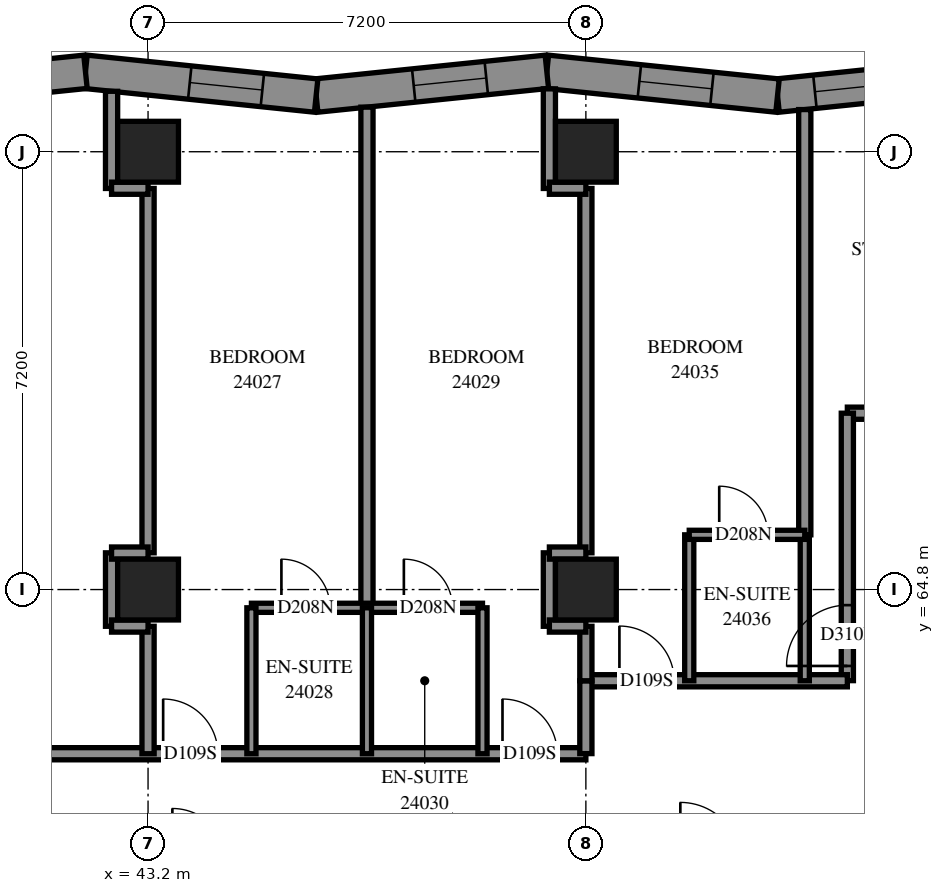
"""IFC4 building model, lengths in metres.
Left out: names, types, materials, properties, quantities, classifications, styles, units other than length and angle.
Written with IfcOpenShell. Run it as: python <this file> out.ifc"""

import sys

from ifc_helpers import new_model, si_unit, direction, frame, frame_2d, origin, origin_2d, place, context, subcontext, project, spatial, polyline, rectangle, outline, extrude, element, fill, save


model = new_model("IFC4")
c1 = context("Model", 3, precision=1e-05, world=origin(), true_north=direction((0.0, 1.0)))
c2 = subcontext(c1, "Body", "Model", "MODEL_VIEW")
j1 = project(units=[si_unit("LENGTHUNIT", "METRE"), si_unit("PLANEANGLEUNIT", "RADIAN")], contexts=[c1])
p1 = place(None, origin())
s1 = spatial("IfcSite", under=j1, at=p1, CompositionType="ELEMENT")
p2 = place(p1, origin())
s2 = spatial("IfcBuilding", under=s1, at=p2, CompositionType="ELEMENT")
p3 = place(p2, frame((0.0, 0.0, 91.4)))
s3 = spatial("IfcBuildingStorey", under=s2, at=p3, CompositionType="ELEMENT", Elevation=91.4)
for number, where, z_axis, x_axis in (
    (1, (43.2, 64.8, 0.0), (0.0, 0.0, 1.0), (1.0, 0.0, 0.0)),
    (2, (43.2, 72.0, 0.0), (0.0, 0.0, 1.0), (1.0, 0.0, 0.0)),
    (3, (50.4, 64.8, 0.0), (0.0, 0.0, 1.0), (1.0, 0.0, 0.0)),
    (4, (50.4, 72.0, 0.0), (0.0, 0.0, 1.0), (1.0, 0.0, 0.0)),
):
    element("IfcColumn", number, at=place(p3, frame(where, z_axis=z_axis, x_axis=x_axis)), inside=s3, PredefinedType="COLUMN", context=c2, shape_type="SweptSolid", body=[
        extrude(rectangle(XDim=1.0, YDim=1.0, at=origin_2d()), origin(), (0.0, 0.0, 1.0), 3.1),
    ])
p4 = place(p3, frame((57.346, 73.314, 0.0), z_axis=(0.0, 0.0, 1.0), x_axis=(-0.9947304076, -0.1025251975, 0.0)))
e5 = element("IfcWall", 5, at=p4, inside=s3, PredefinedType="SOLIDWALL", context=c2, shape_type="SweptSolid", body=[
    extrude(outline(polyline([(-0.028, -0.275), (3.785, -0.275), (3.842, 0.275), (0.028, 0.275), (-0.028, -0.275)])), origin(), (0.0, 0.0, 1.0), 3.1),
])
p5 = place(p4, frame((0.396, 0.0, 0.5)))
e6 = element("IfcOpeningElement", 6, at=p5, cuts=e5, PredefinedType="OPENING", context=c2, shape_type="SweptSolid", body=[
    extrude(rectangle(XDim=1.3, YDim=2.45, at=frame_2d((0.65, 1.225))), frame((0.0, 0.285, 0.0), z_axis=(0.0, -1.0, 0.0), x_axis=(1.0, 0.0, 0.0)), (0.0, 0.0, 1.0), 0.57),
])
p6 = place(p4, frame((1.896, 0.0, 0.5)))
e7 = element("IfcOpeningElement", 7, at=p6, cuts=e5, PredefinedType="OPENING", context=c2, shape_type="SweptSolid", body=[
    extrude(rectangle(XDim=1.3, YDim=2.45, at=frame_2d((0.65, 1.225))), frame((0.0, 0.285, 0.0), z_axis=(0.0, -1.0, 0.0), x_axis=(1.0, 0.0, 0.0)), (0.0, 0.0, 1.0), 0.57),
])
p7 = place(p3, frame((53.552, 72.924, 0.0), z_axis=(0.0, 0.0, 1.0), x_axis=(-0.9947306832, 0.1025225234, 0.0)))
e8 = element("IfcWall", 8, at=p7, inside=s3, PredefinedType="SOLIDWALL", context=c2, shape_type="SweptSolid", body=[
    extrude(outline(polyline([(0.028, -0.275), (3.842, -0.275), (3.785, 0.275), (-0.028, 0.275), (0.028, -0.275)])), origin(), (0.0, 0.0, 1.0), 3.1),
])
p8 = place(p7, frame((1.084, 0.0, 0.5)))
e9 = element("IfcOpeningElement", 9, at=p8, cuts=e8, PredefinedType="OPENING", context=c2, shape_type="SweptSolid", body=[
    extrude(rectangle(XDim=1.2, YDim=2.45, at=frame_2d((0.6, 1.225))), frame((0.0, 0.285, 0.0), z_axis=(0.0, -1.0, 0.0), x_axis=(1.0, 0.0, 0.0)), (0.0, 0.0, 1.0), 0.57),
])
p9 = place(p3, frame((49.758, 73.314, 0.0), z_axis=(0.0, 0.0, 1.0), x_axis=(-0.9947306832, -0.1025225234, 0.0)))
e10 = element("IfcWall", 10, at=p9, inside=s3, PredefinedType="SOLIDWALL", context=c2, shape_type="SweptSolid", body=[
    extrude(outline(polyline([(-0.028, -0.275), (3.785, -0.275), (3.842, 0.275), (0.028, 0.275), (-0.028, -0.275)])), origin(), (0.0, 0.0, 1.0), 3.1),
])
p10 = place(p9, frame((1.001, 0.0, 0.5)))
e11 = element("IfcOpeningElement", 11, at=p10, cuts=e10, PredefinedType="OPENING", context=c2, shape_type="SweptSolid", body=[
    extrude(rectangle(XDim=1.2, YDim=2.45, at=frame_2d((0.6, 1.225))), frame((0.0, 0.285, 0.0), z_axis=(0.0, -1.0, 0.0), x_axis=(1.0, 0.0, 0.0)), (0.0, 0.0, 1.0), 0.57),
])
p11 = place(p3, frame((45.965, 72.924, 0.0), z_axis=(0.0, 0.0, 1.0), x_axis=(-0.9947304076, 0.1025251975, 0.0)))
e12 = element("IfcWall", 12, at=p11, inside=s3, PredefinedType="SOLIDWALL", context=c2, shape_type="SweptSolid", body=[
    extrude(outline(polyline([(0.028, -0.275), (3.842, -0.275), (3.785, 0.275), (-0.028, 0.275), (0.028, -0.275)])), origin(), (0.0, 0.0, 1.0), 3.1),
])
p12 = place(p11, frame((0.89, 0.0, 0.5)))
e13 = element("IfcOpeningElement", 13, at=p12, cuts=e12, PredefinedType="OPENING", context=c2, shape_type="SweptSolid", body=[
    extrude(rectangle(XDim=1.2, YDim=2.45, at=frame_2d((0.6, 1.225))), frame((0.0, 0.285, 0.0), z_axis=(0.0, -1.0, 0.0), x_axis=(1.0, 0.0, 0.0)), (0.0, 0.0, 1.0), 0.57),
])
p13 = place(p3, frame((42.171, 73.314, 0.0), z_axis=(0.0, 0.0, 1.0), x_axis=(-0.9947306832, -0.1025225234, 0.0)))
e14 = element("IfcWall", 14, at=p13, inside=s3, PredefinedType="SOLIDWALL", context=c2, shape_type="SweptSolid", body=[
    extrude(outline(polyline([(-0.028, -0.275), (3.785, -0.275), (3.842, 0.275), (0.028, 0.275), (-0.028, -0.275)])), origin(), (0.0, 0.0, 1.0), 3.1),
])
p14 = place(p13, frame((0.806, 0.0, 0.5)))
e15 = element("IfcOpeningElement", 15, at=p14, cuts=e14, PredefinedType="OPENING", context=c2, shape_type="SweptSolid", body=[
    extrude(rectangle(XDim=1.2, YDim=2.45, at=frame_2d((0.6, 1.225))), frame((0.0, 0.285, 0.0), z_axis=(0.0, -1.0, 0.0), x_axis=(1.0, 0.0, 0.0)), (0.0, 0.0, 1.0), 0.57),
])
p15 = place(p3, frame((54.7, 67.7, 0.0), z_axis=(0.0, 0.0, 1.0), x_axis=(1.0, 0.0, 0.0)))
e16 = element("IfcWall", 16, at=p15, inside=s3, PredefinedType="PARTITIONING", context=c2, shape_type="SweptSolid", body=[
    extrude(rectangle(XDim=20.2, YDim=0.2, at=frame_2d((10.1, 0.0))), origin(), (0.0, 0.0, 1.0), 3.1),
])
p16 = place(p15, frame((5.25, 0.0, 0.0)))
e17 = element("IfcOpeningElement", 17, at=p16, cuts=e16, PredefinedType="OPENING", context=c2, shape_type="SweptSolid", body=[
    extrude(rectangle(XDim=0.9, YDim=2.1, at=frame_2d((0.45, 1.05))), frame((0.0, 0.11, 0.0), z_axis=(0.0, -1.0, 0.0), x_axis=(1.0, 0.0, 0.0)), (0.0, 0.0, 1.0), 0.22),
])
p17 = place(p15, frame((6.9, 0.0, 0.0)))
e18 = element("IfcOpeningElement", 18, at=p17, cuts=e16, PredefinedType="OPENING", context=c2, shape_type="SweptSolid", body=[
    extrude(rectangle(XDim=0.9, YDim=2.1, at=frame_2d((0.45, 1.05))), frame((0.0, 0.11, 0.0), z_axis=(0.0, -1.0, 0.0), x_axis=(1.0, 0.0, 0.0)), (0.0, 0.0, 1.0), 0.22),
])
p18 = place(p15, frame((12.45, 0.0, 0.0)))
e19 = element("IfcOpeningElement", 19, at=p18, cuts=e16, PredefinedType="OPENING", context=c2, shape_type="SweptSolid", body=[
    extrude(rectangle(XDim=0.9, YDim=2.1, at=frame_2d((0.45, 1.05))), frame((0.0, 0.11, 0.0), z_axis=(0.0, -1.0, 0.0), x_axis=(1.0, 0.0, 0.0)), (0.0, 0.0, 1.0), 0.22),
])
p19 = place(p15, frame((14.1, 0.0, 0.0)))
e20 = element("IfcOpeningElement", 20, at=p19, cuts=e16, PredefinedType="OPENING", context=c2, shape_type="SweptSolid", body=[
    extrude(rectangle(XDim=0.9, YDim=2.1, at=frame_2d((0.45, 1.05))), frame((0.0, 0.11, 0.0), z_axis=(0.0, -1.0, 0.0), x_axis=(1.0, 0.0, 0.0)), (0.0, 0.0, 1.0), 0.22),
])
p20 = place(p3, frame((33.3, 62.1, 0.0), z_axis=(0.0, 0.0, 1.0), x_axis=(1.0, 0.0, 0.0)))
e21 = element("IfcWall", 21, at=p20, inside=s3, PredefinedType="PARTITIONING", context=c2, shape_type="SweptSolid", body=[
    extrude(rectangle(XDim=17.1, YDim=0.2, at=frame_2d((8.55, 0.0))), origin(), (0.0, 0.0, 1.0), 3.1),
])
p21 = place(p20, frame((6.258, 0.0, 0.0)))
e22 = element("IfcOpeningElement", 22, at=p21, cuts=e21, PredefinedType="OPENING", context=c2, shape_type="SweptSolid", body=[
    extrude(rectangle(XDim=1.0, YDim=2.1, at=frame_2d((0.5, 1.05))), frame((0.0, 0.11, 0.0), z_axis=(0.0, -1.0, 0.0), x_axis=(1.0, 0.0, 0.0)), (0.0, 0.0, 1.0), 0.22),
])
p22 = place(p20, frame((10.148, 0.0, 0.0)))
e23 = element("IfcOpeningElement", 23, at=p22, cuts=e21, PredefinedType="OPENING", context=c2, shape_type="SweptSolid", body=[
    extrude(rectangle(XDim=0.9, YDim=2.1, at=frame_2d((0.45, 1.05))), frame((0.0, 0.11, 0.0), z_axis=(0.0, -1.0, 0.0), x_axis=(1.0, 0.0, 0.0)), (0.0, 0.0, 1.0), 0.22),
])
p23 = place(p20, frame((15.729, 0.0, 0.0)))
e24 = element("IfcOpeningElement", 24, at=p23, cuts=e21, PredefinedType="OPENING", context=c2, shape_type="SweptSolid", body=[
    extrude(rectangle(XDim=0.9, YDim=2.1, at=frame_2d((0.45, 1.05))), frame((0.0, 0.11, 0.0), z_axis=(0.0, -1.0, 0.0), x_axis=(1.0, 0.0, 0.0)), (0.0, 0.0, 1.0), 0.22),
])
p24 = place(p3, frame((46.8, 64.5, 0.0), z_axis=(0.0, 0.0, 1.0), x_axis=(0.0, 1.0, 0.0)))
e25 = element("IfcWall", 25, at=p24, inside=s3, PredefinedType="PARTITIONING", context=c2, shape_type="SweptSolid", body=[
    extrude(rectangle(XDim=8.233, YDim=0.2, at=frame_2d((4.117, 0.0))), origin(), (0.0, 0.0, 1.0), 3.1),
])
p25 = place(p3, frame((54.0, 65.7, 0.0), z_axis=(0.0, 0.0, 1.0), x_axis=(0.0, 1.0, 0.0)))
e26 = element("IfcWall", 26, at=p25, inside=s3, PredefinedType="PARTITIONING", context=c2, shape_type="SweptSolid", body=[
    extrude(rectangle(XDim=6.993, YDim=0.2, at=frame_2d((3.497, 0.0))), origin(), (0.0, 0.0, 1.0), 3.1),
])
for number, where, z_axis, x_axis in (
    (27, (43.2, 65.404, 0.0), (0.0, 0.0, 1.0), (0.0, 1.0, 0.0)),
    (28, (50.4, 65.404, 0.0), (0.0, 0.0, 1.0), (0.0, 1.0, 0.0)),
):
    element("IfcWall", number, at=place(p3, frame(where, z_axis=z_axis, x_axis=x_axis)), inside=s3, PredefinedType="PARTITIONING", context=c2, shape_type="SweptSolid", body=[
        extrude(rectangle(XDim=5.992, YDim=0.2, at=frame_2d((2.996, 0.0))), origin(), (0.0, 0.0, 1.0), 3.1),
    ])
p26 = place(p3, frame((54.7, 63.302, 0.0), z_axis=(0.0, 0.0, 1.0), x_axis=(0.0, 1.0, 0.0)))
e29 = element("IfcWall", 29, at=p26, inside=s3, PredefinedType="PARTITIONING", context=c2, shape_type="SweptSolid", body=[
    extrude(rectangle(XDim=4.398, YDim=0.2, at=frame_2d((2.199, 0.0))), origin(), (0.0, 0.0, 1.0), 3.1),
])
p27 = place(p26, frame((0.242, 0.0, 0.0)))
e30 = element("IfcOpeningElement", 30, at=p27, cuts=e29, PredefinedType="OPENING", context=c2, shape_type="SweptSolid", body=[
    extrude(rectangle(XDim=1.0, YDim=2.1, at=frame_2d((0.5, 1.05))), frame((0.0, 0.11, 0.0), z_axis=(0.0, -1.0, 0.0), x_axis=(1.0, 0.0, 0.0)), (0.0, 0.0, 1.0), 0.22),
])
p28 = place(p3, frame((50.4, 63.3, 0.0), z_axis=(0.0, 0.0, 1.0), x_axis=(1.0, 0.0, 0.0)))
e31 = element("IfcWall", 31, at=p28, inside=s3, PredefinedType="PARTITIONING", context=c2, shape_type="SweptSolid", body=[
    extrude(rectangle(XDim=4.3, YDim=0.2, at=frame_2d((2.15, 0.0))), origin(), (0.0, 0.0, 1.0), 3.1),
])
p29 = place(p28, frame((0.552, 0.0, 0.0)))
e32 = element("IfcOpeningElement", 32, at=p29, cuts=e31, PredefinedType="OPENING", context=c2, shape_type="SweptSolid", body=[
    extrude(rectangle(XDim=0.9, YDim=2.1, at=frame_2d((0.45, 1.05))), frame((0.0, 0.11, 0.0), z_axis=(0.0, -1.0, 0.0), x_axis=(1.0, 0.0, 0.0)), (0.0, 0.0, 1.0), 0.22),
])
p30 = place(p3, frame((44.9, 64.5, 0.0), z_axis=(0.0, 0.0, 1.0), x_axis=(1.0, 0.0, 0.0)))
e33 = element("IfcWall", 33, at=p30, inside=s3, PredefinedType="PARTITIONING", context=c2, shape_type="SweptSolid", body=[
    extrude(rectangle(XDim=3.8, YDim=0.15, at=frame_2d((1.9, 0.0))), origin(), (0.0, 0.0, 1.0), 3.1),
])
p31 = place(p30, frame((0.493, 0.0, 0.0)))
e34 = element("IfcOpeningElement", 34, at=p31, cuts=e33, PredefinedType="OPENING", context=c2, shape_type="SweptSolid", body=[
    extrude(rectangle(XDim=0.8, YDim=2.1, at=frame_2d((0.4, 1.05))), frame((0.0, 0.085, 0.0), z_axis=(0.0, -1.0, 0.0), x_axis=(1.0, 0.0, 0.0)), (0.0, 0.0, 1.0), 0.17),
])
p32 = place(p30, frame((2.507, 0.0, 0.0)))
e35 = element("IfcOpeningElement", 35, at=p32, cuts=e33, PredefinedType="OPENING", context=c2, shape_type="SweptSolid", body=[
    extrude(rectangle(XDim=0.8, YDim=2.1, at=frame_2d((0.4, 1.05))), frame((0.0, 0.085, 0.0), z_axis=(0.0, -1.0, 0.0), x_axis=(1.0, 0.0, 0.0)), (0.0, 0.0, 1.0), 0.17),
])
for number, where, z_axis, x_axis in (
    (36, (52.1, 63.3, 0.0), (0.0, 0.0, 1.0), (0.0, 1.0, 0.0)),
    (37, (54.0, 63.3, 0.0), (0.0, 0.0, 1.0), (0.0, 1.0, 0.0)),
    (38, (44.9, 62.1, 0.0), (0.0, 0.0, 1.0), (0.0, 1.0, 0.0)),
    (39, (46.8, 62.1, 0.0), (0.0, 0.0, 1.0), (0.0, 1.0, 0.0)),
    (40, (48.7, 62.1, 0.0), (0.0, 0.0, 1.0), (0.0, 1.0, 0.0)),
):
    element("IfcWall", number, at=place(p3, frame(where, z_axis=z_axis, x_axis=x_axis)), inside=s3, PredefinedType="PARTITIONING", context=c2, shape_type="SweptSolid", body=[
        extrude(rectangle(XDim=2.4, YDim=0.15, at=frame_2d((1.2, 0.0))), origin(), (0.0, 0.0, 1.0), 3.1),
    ])
p33 = place(p3, frame((43.2, 62.1, 0.0), z_axis=(0.0, 0.0, 1.0), x_axis=(0.0, 1.0, 0.0)))
e41 = element("IfcWall", 41, at=p33, inside=s3, PredefinedType="PARTITIONING", context=c2, shape_type="SweptSolid", body=[
    extrude(rectangle(XDim=2.096, YDim=0.2, at=frame_2d((1.048, 0.0))), origin(), (0.0, 0.0, 1.0), 3.1),
])
p34 = place(p3, frame((52.1, 65.7, 0.0), z_axis=(0.0, 0.0, 1.0), x_axis=(1.0, 0.0, 0.0)))
e42 = element("IfcWall", 42, at=p34, inside=s3, PredefinedType="PARTITIONING", context=c2, shape_type="SweptSolid", body=[
    extrude(rectangle(XDim=1.9, YDim=0.15, at=frame_2d((0.95, 0.0))), origin(), (0.0, 0.0, 1.0), 3.1),
])
p35 = place(p34, frame((0.493, 0.0, 0.0)))
e43 = element("IfcOpeningElement", 43, at=p35, cuts=e42, PredefinedType="OPENING", context=c2, shape_type="SweptSolid", body=[
    extrude(rectangle(XDim=0.8, YDim=2.1, at=frame_2d((0.4, 1.05))), frame((0.0, 0.085, 0.0), z_axis=(0.0, -1.0, 0.0), x_axis=(1.0, 0.0, 0.0)), (0.0, 0.0, 1.0), 0.17),
])
p36 = place(p3, frame((49.8, 71.396, 0.0), z_axis=(0.0, 0.0, 1.0), x_axis=(0.0, 1.0, 0.0)))
e44 = element("IfcWall", 44, at=p36, inside=s3, PredefinedType="PARTITIONING", context=c2, shape_type="SweptSolid", body=[
    extrude(rectangle(XDim=1.638, YDim=0.2, at=frame_2d((0.819, 0.0))), origin(), (0.0, 0.0, 1.0), 3.1),
])
p37 = place(p3, frame((42.6, 71.396, 0.0), z_axis=(0.0, 0.0, 1.0), x_axis=(0.0, 1.0, 0.0)))
e45 = element("IfcWall", 45, at=p37, inside=s3, PredefinedType="PARTITIONING", context=c2, shape_type="SweptSolid", body=[
    extrude(rectangle(XDim=1.598, YDim=0.2, at=frame_2d((0.799, 0.0))), origin(), (0.0, 0.0, 1.0), 3.1),
])
for number, where, z_axis, x_axis in (
    (46, (42.6, 64.196, 0.0), (0.0, 0.0, 1.0), (0.0, 1.0, 0.0)),
    (47, (49.8, 64.196, 0.0), (0.0, 0.0, 1.0), (0.0, 1.0, 0.0)),
):
    element("IfcWall", number, at=place(p3, frame(where, z_axis=z_axis, x_axis=x_axis)), inside=s3, PredefinedType="PARTITIONING", context=c2, shape_type="SweptSolid", body=[
        extrude(rectangle(XDim=1.208, YDim=0.2, at=frame_2d((0.604, 0.0))), origin(), (0.0, 0.0, 1.0), 3.1),
    ])
p38 = place(p3, frame((50.4, 62.102, 0.0), z_axis=(0.0, 0.0, 1.0), x_axis=(0.0, 1.0, 0.0)))
e48 = element("IfcWall", 48, at=p38, inside=s3, PredefinedType="PARTITIONING", context=c2, shape_type="SweptSolid", body=[
    extrude(rectangle(XDim=1.198, YDim=0.2, at=frame_2d((0.599, 0.0))), origin(), (0.0, 0.0, 1.0), 3.1),
])
p39 = place(p3, frame((50.4, 63.3, 0.0), z_axis=(0.0, 0.0, 1.0), x_axis=(0.0, 1.0, 0.0)))
e49 = element("IfcWall", 49, at=p39, inside=s3, PredefinedType="PARTITIONING", context=c2, shape_type="SweptSolid", body=[
    extrude(rectangle(XDim=0.896, YDim=0.2, at=frame_2d((0.448, 0.0))), origin(), (0.0, 0.0, 1.0), 3.1),
])
for number, where, z_axis, x_axis in (
    (50, (42.6, 71.4, 0.0), (0.0, 0.0, 1.0), (1.0, 0.0, 0.0)),
    (51, (49.8, 71.4, 0.0), (0.0, 0.0, 1.0), (1.0, 0.0, 0.0)),
    (52, (42.6, 65.4, 0.0), (0.0, 0.0, 1.0), (1.0, 0.0, 0.0)),
    (53, (49.8, 65.4, 0.0), (0.0, 0.0, 1.0), (1.0, 0.0, 0.0)),
    (54, (42.6, 64.2, 0.0), (0.0, 0.0, 1.0), (1.0, 0.0, 0.0)),
    (55, (49.8, 64.2, 0.0), (0.0, 0.0, 1.0), (1.0, 0.0, 0.0)),
):
    element("IfcWall", number, at=place(p3, frame(where, z_axis=z_axis, x_axis=x_axis)), inside=s3, PredefinedType="PARTITIONING", context=c2, shape_type="SweptSolid", body=[
        extrude(rectangle(XDim=0.6, YDim=0.2, at=frame_2d((0.3, 0.0))), origin(), (0.0, 0.0, 1.0), 3.1),
    ])
p40 = place(p6, origin())
e56 = element("IfcWindow", 56, at=p40, inside=s3, PartitioningType="SINGLE_PANEL", PredefinedType="WINDOW", context=c2, shape_type="SweptSolid", body=[
    extrude(rectangle(XDim=1.3, YDim=2.45, at=frame_2d((0.65, 1.225))), frame((0.0, 0.155, 0.0), z_axis=(0.0, -1.0, 0.0), x_axis=(1.0, 0.0, 0.0)), (0.0, 0.0, 1.0), 0.06),
])
fill(e7, e56)
p41 = place(p8, origin())
e57 = element("IfcWindow", 57, at=p41, inside=s3, PartitioningType="SINGLE_PANEL", PredefinedType="WINDOW", context=c2, shape_type="SweptSolid", body=[
    extrude(rectangle(XDim=1.2, YDim=2.45, at=frame_2d((0.6, 1.225))), frame((0.0, 0.155, 0.0), z_axis=(0.0, -1.0, 0.0), x_axis=(1.0, 0.0, 0.0)), (0.0, 0.0, 1.0), 0.06),
])
fill(e9, e57)
p42 = place(p10, origin())
e58 = element("IfcWindow", 58, at=p42, inside=s3, PartitioningType="SINGLE_PANEL", PredefinedType="WINDOW", context=c2, shape_type="SweptSolid", body=[
    extrude(rectangle(XDim=1.2, YDim=2.45, at=frame_2d((0.6, 1.225))), frame((0.0, 0.155, 0.0), z_axis=(0.0, -1.0, 0.0), x_axis=(1.0, 0.0, 0.0)), (0.0, 0.0, 1.0), 0.06),
])
fill(e11, e58)
p43 = place(p12, origin())
e59 = element("IfcWindow", 59, at=p43, inside=s3, PartitioningType="SINGLE_PANEL", PredefinedType="WINDOW", context=c2, shape_type="SweptSolid", body=[
    extrude(rectangle(XDim=1.2, YDim=2.45, at=frame_2d((0.6, 1.225))), frame((0.0, 0.155, 0.0), z_axis=(0.0, -1.0, 0.0), x_axis=(1.0, 0.0, 0.0)), (0.0, 0.0, 1.0), 0.06),
])
fill(e13, e59)
p44 = place(p22, origin())
e60 = element("IfcDoor", 60, at=p44, inside=s3, OperationType="SINGLE_SWING_RIGHT", PredefinedType="DOOR", context=c2, shape_type="SweptSolid", body=[
    extrude(rectangle(XDim=0.9, YDim=2.1, at=frame_2d((0.45, 1.05))), frame((0.0, 0.025, 0.0), z_axis=(0.0, -1.0, 0.0), x_axis=(1.0, 0.0, 0.0)), (0.0, 0.0, 1.0), 0.05),
])
fill(e23, e60)
p45 = place(p31, origin())
e61 = element("IfcDoor", 61, at=p45, inside=s3, OperationType="SINGLE_SWING_RIGHT", PredefinedType="DOOR", context=c2, shape_type="SweptSolid", body=[
    extrude(rectangle(XDim=0.8, YDim=2.1, at=frame_2d((0.4, 1.05))), frame((0.0, 0.025, 0.0), z_axis=(0.0, -1.0, 0.0), x_axis=(1.0, 0.0, 0.0)), (0.0, 0.0, 1.0), 0.05),
])
fill(e34, e61)
p46 = place(p23, origin())
e62 = element("IfcDoor", 62, at=p46, inside=s3, OperationType="SINGLE_SWING_LEFT", PredefinedType="DOOR", context=c2, shape_type="SweptSolid", body=[
    extrude(rectangle(XDim=0.9, YDim=2.1, at=frame_2d((0.45, 1.05))), frame((0.0, 0.025, 0.0), z_axis=(0.0, -1.0, 0.0), x_axis=(1.0, 0.0, 0.0)), (0.0, 0.0, 1.0), 0.05),
])
fill(e24, e62)
p47 = place(p32, origin())
e63 = element("IfcDoor", 63, at=p47, inside=s3, OperationType="SINGLE_SWING_RIGHT", PredefinedType="DOOR", context=c2, shape_type="SweptSolid", body=[
    extrude(rectangle(XDim=0.8, YDim=2.1, at=frame_2d((0.4, 1.05))), frame((0.0, 0.025, 0.0), z_axis=(0.0, -1.0, 0.0), x_axis=(1.0, 0.0, 0.0)), (0.0, 0.0, 1.0), 0.05),
])
fill(e35, e63)
p48 = place(p29, origin())
e64 = element("IfcDoor", 64, at=p48, inside=s3, OperationType="SINGLE_SWING_RIGHT", PredefinedType="DOOR", context=c2, shape_type="SweptSolid", body=[
    extrude(rectangle(XDim=0.9, YDim=2.1, at=frame_2d((0.45, 1.05))), frame((0.0, 0.025, 0.0), z_axis=(0.0, -1.0, 0.0), x_axis=(1.0, 0.0, 0.0)), (0.0, 0.0, 1.0), 0.05),
])
fill(e32, e64)
p49 = place(p35, origin())
e65 = element("IfcDoor", 65, at=p49, inside=s3, OperationType="SINGLE_SWING_RIGHT", PredefinedType="DOOR", context=c2, shape_type="SweptSolid", body=[
    extrude(rectangle(XDim=0.8, YDim=2.1, at=frame_2d((0.4, 1.05))), frame((0.0, 0.025, 0.0), z_axis=(0.0, -1.0, 0.0), x_axis=(1.0, 0.0, 0.0)), (0.0, 0.0, 1.0), 0.05),
])
fill(e43, e65)
p50 = place(p27, origin())
e66 = element("IfcDoor", 66, at=p50, inside=s3, OperationType="SINGLE_SWING_LEFT", PredefinedType="DOOR", context=c2, shape_type="SweptSolid", body=[
    extrude(rectangle(XDim=1.0, YDim=2.1, at=frame_2d((0.5, 1.05))), frame((0.0, 0.025, 0.0), z_axis=(0.0, -1.0, 0.0), x_axis=(1.0, 0.0, 0.0)), (0.0, 0.0, 1.0), 0.05),
])
fill(e30, e66)
save(model, sys.argv[1])
